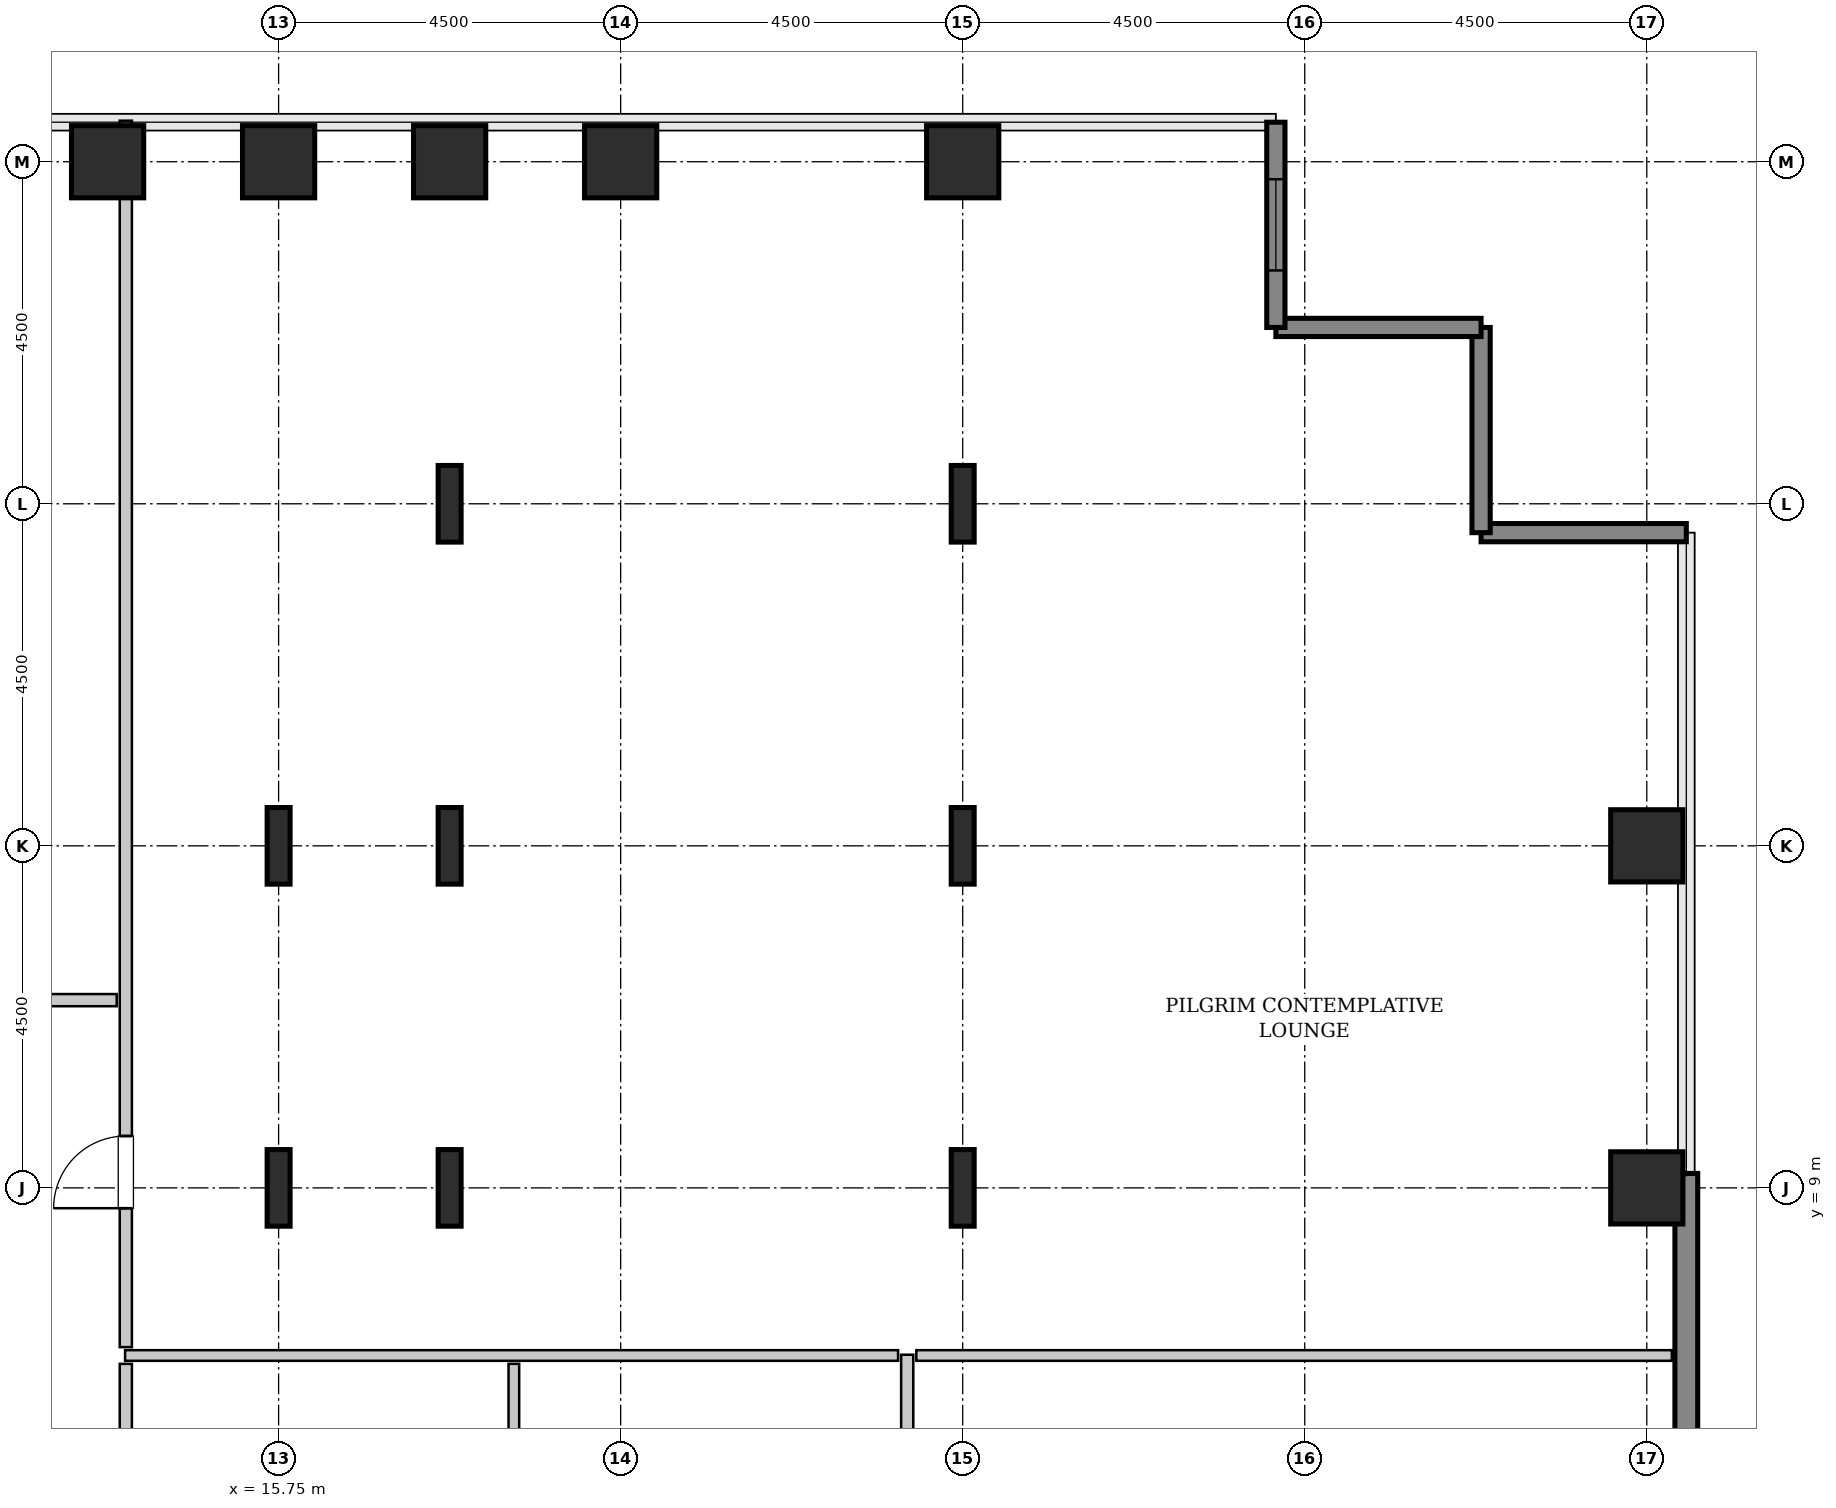
"""IFC4 building model, lengths in metres.
Left out: names, types, materials, properties, quantities, classifications, styles, units other than length and angle.
Written with IfcOpenShell. Run it as: python <this file> out.ifc"""

import sys

from ifc_helpers import new_model, si_unit, direction, frame, frame_2d, origin, origin_2d, place, context, subcontext, project, spatial, rectangle, hollow_rectangle, i_section, extrude, source, transform, mapped, element, fill, save


model = new_model("IFC4")
c1 = context("Model", 3, precision=1e-05, world=origin(), true_north=direction((0.0, 1.0)))
c2 = subcontext(c1, "Body", "Model", "MODEL_VIEW")
j1 = project(units=[si_unit("LENGTHUNIT", "METRE"), si_unit("PLANEANGLEUNIT", "RADIAN")], contexts=[c1])
p1 = place(None, origin())
s1 = spatial("IfcSite", under=j1, at=p1, CompositionType="ELEMENT")
p2 = place(p1, origin())
s2 = spatial("IfcBuilding", under=s1, at=p2, CompositionType="ELEMENT")
p3 = place(p2, frame((0.0, 0.0, 90.8)))
s3 = spatial("IfcBuildingStorey", under=s2, at=p3, CompositionType="ELEMENT", Elevation=90.8)
m1 = source(origin(), c2, "Body", "SweptSolid", [
    extrude(hollow_rectangle(XDim=0.95, YDim=0.95, WallThickness=0.045, InnerFilletRadius=0.045, OuterFilletRadius=0.09, at=origin_2d()), origin(), (0.0, 0.0, 1.0), 3.8),
])
p4 = place(p3, frame((13.5, 22.5, 0.0), z_axis=(0.0, 0.0, 1.0), x_axis=(1.0, 0.0, 0.0)))
e1 = element("IfcColumn", 1, at=p4, inside=s3, PredefinedType="COLUMN", context=c2, shape_type="MappedRepresentation", body=[
    mapped(m1, transform((0.0, 0.0, 0.0), x_axis=(1.0, 0.0, 0.0), y_axis=(0.0, 1.0, 0.0), z_axis=(0.0, 0.0, 1.0), scale=1.0)),
])
m2 = source(origin(), c2, "Body", "SweptSolid", [
    extrude(i_section(OverallWidth=0.302, OverallDepth=1.008, WebThickness=0.021, FlangeThickness=0.04, FilletRadius=0.03, at=origin_2d()), origin(), (0.0, 0.0, 1.0), 3.8),
])
for number, where, z_axis, x_axis in (
    (2, (15.75, 9.0, 0.0), (0.0, 0.0, 1.0), (1.0, 0.0, 0.0)),
    (3, (15.75, 13.5, 0.0), (0.0, 0.0, 1.0), (1.0, 0.0, 0.0)),
):
    element("IfcColumn", number, at=place(p3, frame(where, z_axis=z_axis, x_axis=x_axis)), inside=s3, PredefinedType="COLUMN", context=c2, shape_type="MappedRepresentation", body=[
        mapped(m2, transform((0.0, 0.0, 0.0), x_axis=(1.0, 0.0, 0.0), y_axis=(0.0, 1.0, 0.0), z_axis=(0.0, 0.0, 1.0), scale=1.0)),
    ])
p5 = place(p3, frame((15.75, 22.5, 0.0), z_axis=(0.0, 0.0, 1.0), x_axis=(1.0, 0.0, 0.0)))
e4 = element("IfcColumn", 4, at=p5, inside=s3, PredefinedType="COLUMN", context=c2, shape_type="MappedRepresentation", body=[
    mapped(m1, transform((0.0, 0.0, 0.0), x_axis=(1.0, 0.0, 0.0), y_axis=(0.0, 1.0, 0.0), z_axis=(0.0, 0.0, 1.0), scale=1.0)),
])
for number, where, z_axis, x_axis in (
    (5, (18.0, 9.0, 0.0), (0.0, 0.0, 1.0), (1.0, 0.0, 0.0)),
    (6, (18.0, 13.5, 0.0), (0.0, 0.0, 1.0), (1.0, 0.0, 0.0)),
    (7, (18.0, 18.0, 0.0), (0.0, 0.0, 1.0), (1.0, 0.0, 0.0)),
):
    element("IfcColumn", number, at=place(p3, frame(where, z_axis=z_axis, x_axis=x_axis)), inside=s3, PredefinedType="COLUMN", context=c2, shape_type="MappedRepresentation", body=[
        mapped(m2, transform((0.0, 0.0, 0.0), x_axis=(1.0, 0.0, 0.0), y_axis=(0.0, 1.0, 0.0), z_axis=(0.0, 0.0, 1.0), scale=1.0)),
    ])
for number, where, z_axis, x_axis in (
    (8, (18.0, 22.5, 0.0), (0.0, 0.0, 1.0), (1.0, 0.0, 0.0)),
    (9, (20.25, 22.5, 0.0), (0.0, 0.0, 1.0), (1.0, 0.0, 0.0)),
):
    element("IfcColumn", number, at=place(p3, frame(where, z_axis=z_axis, x_axis=x_axis)), inside=s3, PredefinedType="COLUMN", context=c2, shape_type="MappedRepresentation", body=[
        mapped(m1, transform((0.0, 0.0, 0.0), x_axis=(1.0, 0.0, 0.0), y_axis=(0.0, 1.0, 0.0), z_axis=(0.0, 0.0, 1.0), scale=1.0)),
    ])
for number, where, z_axis, x_axis in (
    (10, (24.75, 9.0, 0.0), (0.0, 0.0, 1.0), (1.0, 0.0, 0.0)),
    (11, (24.75, 13.5, 0.0), (0.0, 0.0, 1.0), (1.0, 0.0, 0.0)),
    (12, (24.75, 18.0, 0.0), (0.0, 0.0, 1.0), (1.0, 0.0, 0.0)),
):
    element("IfcColumn", number, at=place(p3, frame(where, z_axis=z_axis, x_axis=x_axis)), inside=s3, PredefinedType="COLUMN", context=c2, shape_type="MappedRepresentation", body=[
        mapped(m2, transform((0.0, 0.0, 0.0), x_axis=(1.0, 0.0, 0.0), y_axis=(0.0, 1.0, 0.0), z_axis=(0.0, 0.0, 1.0), scale=1.0)),
    ])
for number, where, z_axis, x_axis in (
    (13, (24.75, 22.5, 0.0), (0.0, 0.0, 1.0), (1.0, 0.0, 0.0)),
    (14, (33.75, 9.0, 0.0), (0.0, 0.0, 1.0), (1.0, 0.0, 0.0)),
    (15, (33.75, 13.5, 0.0), (0.0, 0.0, 1.0), (1.0, 0.0, 0.0)),
):
    element("IfcColumn", number, at=place(p3, frame(where, z_axis=z_axis, x_axis=x_axis)), inside=s3, PredefinedType="COLUMN", context=c2, shape_type="MappedRepresentation", body=[
        mapped(m1, transform((0.0, 0.0, 0.0), x_axis=(1.0, 0.0, 0.0), y_axis=(0.0, 1.0, 0.0), z_axis=(0.0, 0.0, 1.0), scale=1.0)),
    ])
m3 = source(origin(), c2, "Body", "SweptSolid", [
    extrude(rectangle(XDim=4.88, YDim=0.3, at=frame_2d((2.44, 0.0))), origin(), (0.0, 0.0, 1.0), 3.55),
])
p6 = place(p3, frame((34.27, 4.31, 0.0), z_axis=(0.0, 0.0, 1.0), x_axis=(0.0, 1.0, 0.0)))
e16 = element("IfcWall", 16, at=p6, inside=s3, PredefinedType="SHEAR", context=c2, shape_type="MappedRepresentation", body=[
    mapped(m3, transform((0.0, 0.0, 0.0), x_axis=(1.0, 0.0, 0.0), y_axis=(0.0, 1.0, 0.0), z_axis=(0.0, 0.0, 1.0), scale=1.0)),
])
m4 = source(origin(), c2, "Body", "SweptSolid", [
    extrude(rectangle(XDim=2.7, YDim=0.24, at=frame_2d((1.35, 0.0))), origin(), (0.0, 0.0, 1.0), 3.55),
])
for number, where, z_axis, x_axis in (
    (17, (34.27, 17.62, 0.0), (0.0, 0.0, 1.0), (-1.0, 0.0, 0.0)),
    (18, (31.57, 17.62, 0.0), (0.0, 0.0, 1.0), (0.0, 1.0, 0.0)),
    (19, (31.57, 20.32, 0.0), (0.0, 0.0, 1.0), (-1.0, 0.0, 0.0)),
):
    element("IfcWall", number, at=place(p3, frame(where, z_axis=z_axis, x_axis=x_axis)), inside=s3, PredefinedType="SHEAR", context=c2, shape_type="MappedRepresentation", body=[
        mapped(m4, transform((0.0, 0.0, 0.0), x_axis=(1.0, 0.0, 0.0), y_axis=(0.0, 1.0, 0.0), z_axis=(0.0, 0.0, 1.0), scale=1.0)),
    ])
p7 = place(p3, frame((28.87, 20.32, 0.0), z_axis=(0.0, 0.0, 1.0), x_axis=(0.0, 1.0, 0.0)))
e20 = element("IfcWall", 20, at=p7, inside=s3, PredefinedType="SHEAR", context=c2, shape_type="MappedRepresentation", body=[
    mapped(m4, transform((0.0, 0.0, 0.0), x_axis=(1.0, 0.0, 0.0), y_axis=(0.0, 1.0, 0.0), z_axis=(0.0, 0.0, 1.0), scale=1.0)),
])
p8 = place(p7, frame((0.75, 0.0, 0.85)))
e21 = element("IfcOpeningElement", 21, at=p8, cuts=e20, PredefinedType="OPENING", context=c2, shape_type="SweptSolid", body=[
    extrude(rectangle(XDim=1.2, YDim=1.8, at=frame_2d((0.6, 0.9))), frame((0.0, 0.13, 0.0), z_axis=(0.0, -1.0, 0.0), x_axis=(1.0, 0.0, 0.0)), (0.0, 0.0, 1.0), 0.26),
])
m5 = source(origin(), c2, "Body", "SweptSolid", [
    extrude(rectangle(XDim=13.5, YDim=0.16, at=frame_2d((6.75, 0.0))), origin(), (0.0, 0.0, 1.0), 3.535),
])
p9 = place(p3, frame((24.02, -6.695, 0.0), z_axis=(0.0, 0.0, 1.0), x_axis=(0.0, 1.0, 0.0)))
e22 = element("IfcWall", 22, at=p9, inside=s3, PredefinedType="PARTITIONING", context=c2, shape_type="MappedRepresentation", body=[
    mapped(m5, transform((0.0, 0.0, 0.0), x_axis=(1.0, 0.0, 0.0), y_axis=(0.0, 1.0, 0.0), z_axis=(0.0, 0.0, 1.0), scale=1.0)),
])
p10 = place(p9, frame((3.97, 0.0, 0.0)))
e23 = element("IfcOpeningElement", 23, at=p10, cuts=e22, PredefinedType="OPENING", context=c2, shape_type="SweptSolid", body=[
    extrude(rectangle(XDim=0.95, YDim=2.1, at=frame_2d((0.475, 1.05))), frame((0.0, 0.09, 0.0), z_axis=(0.0, -1.0, 0.0), x_axis=(1.0, 0.0, 0.0)), (0.0, 0.0, 1.0), 0.18),
])
m6 = source(origin(), c2, "Body", "SweptSolid", [
    extrude(rectangle(XDim=10.17, YDim=0.14, at=frame_2d((5.085, 0.0))), origin(), (0.0, 0.0, 1.0), 3.535),
])
p11 = place(p3, frame((13.73, 6.795, 0.0), z_axis=(0.0, 0.0, 1.0), x_axis=(1.0, 0.0, 0.0)))
e24 = element("IfcWall", 24, at=p11, inside=s3, PredefinedType="PARTITIONING", context=c2, shape_type="MappedRepresentation", body=[
    mapped(m6, transform((0.0, 0.0, 0.0), x_axis=(1.0, 0.0, 0.0), y_axis=(0.0, 1.0, 0.0), z_axis=(0.0, 0.0, 1.0), scale=1.0)),
])
m7 = source(origin(), c2, "Body", "SweptSolid", [
    extrude(rectangle(XDim=9.94, YDim=0.14, at=frame_2d((4.97, 0.0))), origin(), (0.0, 0.0, 1.0), 3.535),
])
p12 = place(p3, frame((24.14, 6.795, 0.0), z_axis=(0.0, 0.0, 1.0), x_axis=(1.0, 0.0, 0.0)))
e25 = element("IfcWall", 25, at=p12, inside=s3, PredefinedType="PARTITIONING", context=c2, shape_type="MappedRepresentation", body=[
    mapped(m7, transform((0.0, 0.0, 0.0), x_axis=(1.0, 0.0, 0.0), y_axis=(0.0, 1.0, 0.0), z_axis=(0.0, 0.0, 1.0), scale=1.0)),
])
m8 = source(origin(), c2, "Body", "SweptSolid", [
    extrude(rectangle(XDim=8.075, YDim=0.16, at=frame_2d((4.038, 0.0))), origin(), (0.0, 0.0, 1.0), 3.535),
])
p13 = place(p3, frame((13.74, -1.39, 0.0), z_axis=(0.0, 0.0, 1.0), x_axis=(0.0, 1.0, 0.0)))
e26 = element("IfcWall", 26, at=p13, inside=s3, PredefinedType="PARTITIONING", context=c2, shape_type="MappedRepresentation", body=[
    mapped(m8, transform((0.0, 0.0, 0.0), x_axis=(1.0, 0.0, 0.0), y_axis=(0.0, 1.0, 0.0), z_axis=(0.0, 0.0, 1.0), scale=1.0)),
])
p14 = place(p13, frame((3.562, 0.0, 0.0)))
e27 = element("IfcOpeningElement", 27, at=p14, cuts=e26, PredefinedType="OPENING", context=c2, shape_type="SweptSolid", body=[
    extrude(rectangle(XDim=0.95, YDim=2.1, at=frame_2d((0.475, 1.05))), frame((0.0, 0.09, 0.0), z_axis=(0.0, -1.0, 0.0), x_axis=(1.0, 0.0, 0.0)), (0.0, 0.0, 1.0), 0.18),
])
m9 = source(origin(), c2, "Body", "SweptSolid", [
    extrude(rectangle(XDim=7.955, YDim=0.14, at=frame_2d((3.978, 0.0))), origin(), (0.0, 0.0, 1.0), 3.535),
])
p15 = place(p3, frame((18.845, -1.27, 0.0), z_axis=(0.0, 0.0, 1.0), x_axis=(0.0, 1.0, 0.0)))
e28 = element("IfcWall", 28, at=p15, inside=s3, PredefinedType="PARTITIONING", context=c2, shape_type="MappedRepresentation", body=[
    mapped(m9, transform((0.0, 0.0, 0.0), x_axis=(1.0, 0.0, 0.0), y_axis=(0.0, 1.0, 0.0), z_axis=(0.0, 0.0, 1.0), scale=1.0)),
])
m10 = source(origin(), c2, "Body", "SweptSolid", [
    extrude(rectangle(XDim=16.135, YDim=0.16, at=frame_2d((8.067, 0.0))), origin(), (0.0, 0.0, 1.0), 3.535),
])
p16 = place(p3, frame((13.74, 6.905, 0.0), z_axis=(0.0, 0.0, 1.0), x_axis=(0.0, 1.0, 0.0)))
e29 = element("IfcWall", 29, at=p16, inside=s3, PredefinedType="PARTITIONING", context=c2, shape_type="MappedRepresentation", body=[
    mapped(m10, transform((0.0, 0.0, 0.0), x_axis=(1.0, 0.0, 0.0), y_axis=(0.0, 1.0, 0.0), z_axis=(0.0, 0.0, 1.0), scale=1.0)),
])
p17 = place(p16, frame((1.827, 0.0, 0.0)))
e30 = element("IfcOpeningElement", 30, at=p17, cuts=e29, PredefinedType="OPENING", context=c2, shape_type="SweptSolid", body=[
    extrude(rectangle(XDim=0.95, YDim=2.1, at=frame_2d((0.475, 1.05))), frame((0.0, 0.09, 0.0), z_axis=(0.0, -1.0, 0.0), x_axis=(1.0, 0.0, 0.0)), (0.0, 0.0, 1.0), 0.18),
])
m11 = source(origin(), c2, "Body", "SweptSolid", [
    extrude(rectangle(XDim=5.425, YDim=0.16, at=frame_2d((2.712, 0.0))), origin(), (0.0, 0.0, 1.0), 3.535),
])
p18 = place(p3, frame((8.195, 11.47, 0.0), z_axis=(0.0, 0.0, 1.0), x_axis=(1.0, 0.0, 0.0)))
e31 = element("IfcWall", 31, at=p18, inside=s3, PredefinedType="PARTITIONING", context=c2, shape_type="MappedRepresentation", body=[
    mapped(m11, transform((0.0, 0.0, 0.0), x_axis=(1.0, 0.0, 0.0), y_axis=(0.0, 1.0, 0.0), z_axis=(0.0, 0.0, 1.0), scale=1.0)),
])
p19 = place(p18, frame((2.238, 0.0, 0.0)))
e32 = element("IfcOpeningElement", 32, at=p19, cuts=e31, PredefinedType="OPENING", context=c2, shape_type="SweptSolid", body=[
    extrude(rectangle(XDim=0.95, YDim=2.1, at=frame_2d((0.475, 1.05))), frame((0.0, 0.09, 0.0), z_axis=(0.0, -1.0, 0.0), x_axis=(1.0, 0.0, 0.0)), (0.0, 0.0, 1.0), 0.18),
])
m12 = source(origin(), c2, "Body", "SweptSolid", [
    extrude(rectangle(XDim=1.2, YDim=1.8, at=frame_2d((0.6, 0.9))), frame((0.0, 0.03, 0.0), z_axis=(0.0, -1.0, 0.0), x_axis=(1.0, 0.0, 0.0)), (0.0, 0.0, 1.0), 0.06),
])
p20 = place(p8, origin())
e33 = element("IfcWindow", 33, at=p20, inside=s3, PartitioningType="SINGLE_PANEL", PredefinedType="WINDOW", context=c2, shape_type="MappedRepresentation", body=[
    mapped(m12, transform((0.0, 0.0, 0.0), x_axis=(1.0, 0.0, 0.0), y_axis=(0.0, 1.0, 0.0), z_axis=(0.0, 0.0, 1.0), scale=1.0)),
])
fill(e21, e33)
m13 = source(origin(), c2, "Body", "SweptSolid", [
    extrude(rectangle(XDim=0.95, YDim=2.1, at=frame_2d((0.475, 1.05))), frame((0.0, 0.025, 0.0), z_axis=(0.0, -1.0, 0.0), x_axis=(1.0, 0.0, 0.0)), (0.0, 0.0, 1.0), 0.05),
])
p21 = place(p17, origin())
e34 = element("IfcDoor", 34, at=p21, inside=s3, OperationType="SINGLE_SWING_LEFT", PredefinedType="DOOR", context=c2, shape_type="MappedRepresentation", body=[
    mapped(m13, transform((0.0, 0.0, 0.0), x_axis=(1.0, 0.0, 0.0), y_axis=(0.0, 1.0, 0.0), z_axis=(0.0, 0.0, 1.0), scale=1.0)),
])
fill(e30, e34)
save(model, sys.argv[1])
